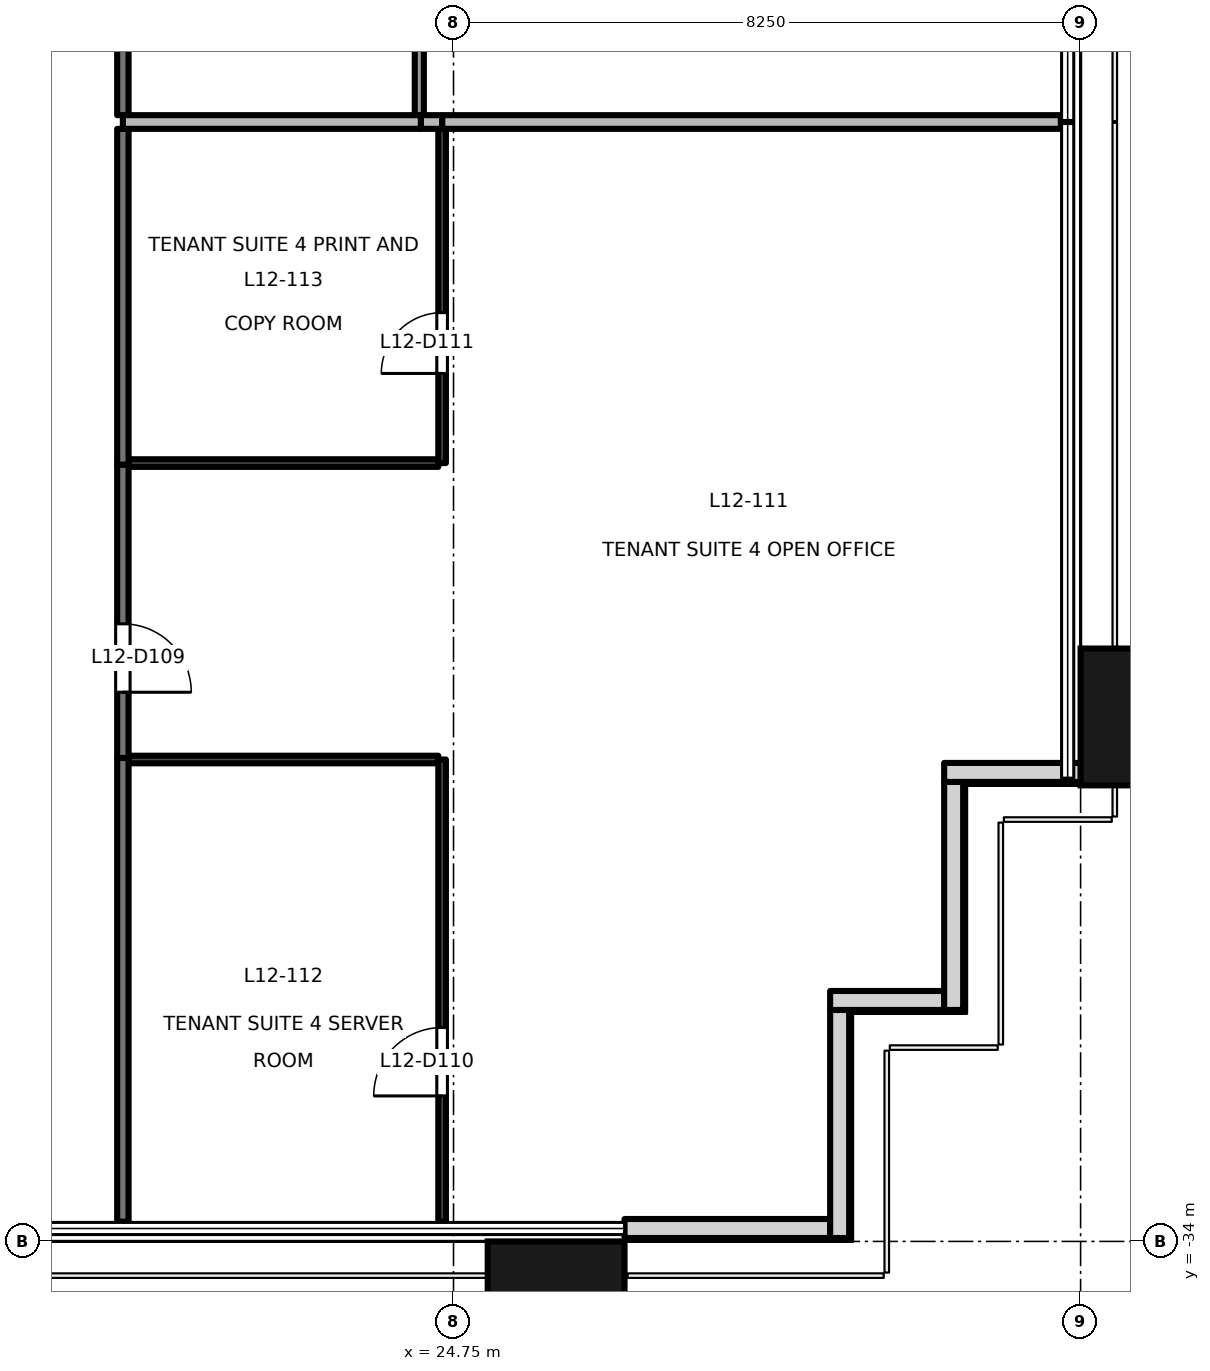
"""IFC4 building model, lengths in metres.
Left out: names, types, materials, properties, quantities, classifications, styles, units other than length and angle.
Written with IfcOpenShell. Run it as: python <this file> out.ifc"""

import sys

from ifc_helpers import new_model, si_unit, direction, frame, frame_2d, origin, origin_2d, place, context, subcontext, project, spatial, rectangle, extrude, element, fill, save


model = new_model("IFC4")
c1 = context("Model", 3, precision=1e-05, world=origin(), true_north=direction((0.0, 1.0)))
c2 = subcontext(c1, "Body", "Model", "MODEL_VIEW")
j1 = project(units=[si_unit("LENGTHUNIT", "METRE"), si_unit("PLANEANGLEUNIT", "RADIAN")], contexts=[c1])
p1 = place(None, origin())
s1 = spatial("IfcSite", under=j1, at=p1, CompositionType="ELEMENT")
p2 = place(p1, origin())
s2 = spatial("IfcBuilding", under=s1, at=p2, CompositionType="ELEMENT")
p3 = place(p2, frame((0.0, 0.0, 57.0)))
s3 = spatial("IfcBuildingStorey", under=s2, at=p3, CompositionType="ELEMENT", Elevation=57.0)
for number, where, z_axis, x_axis in (
    (1, (26.1, -34.9, -0.2), (0.0, 0.0, 1.0), (1.0, 0.0, 0.0)),
    (2, (33.9, -27.1, -0.2), (0.0, 0.0, 1.0), (0.0, 1.0, 0.0)),
):
    element("IfcColumn", number, at=place(p3, frame(where, z_axis=z_axis, x_axis=x_axis)), inside=s3, PredefinedType="COLUMN", context=c2, shape_type="SweptSolid", body=[
        extrude(rectangle(XDim=1.8, YDim=1.8, at=origin_2d()), origin(), (0.0, 0.0, 1.0), 4.1),
    ])
p4 = place(p3, frame((27.0, -33.83, 0.0), z_axis=(0.0, 0.0, 1.0), x_axis=(1.0, 0.0, 0.0)))
e3 = element("IfcWall", 3, at=p4, inside=s3, PredefinedType="SOLIDWALL", context=c2, shape_type="SweptSolid", body=[
    extrude(rectangle(XDim=2.705, YDim=0.25, at=frame_2d((1.353, 0.0))), origin(), (0.0, 0.0, 1.0), 3.9),
])
p5 = place(p3, frame((29.83, -33.955, 0.0), z_axis=(0.0, 0.0, 1.0), x_axis=(0.0, 1.0, 0.0)))
e4 = element("IfcWall", 4, at=p5, inside=s3, PredefinedType="SOLIDWALL", context=c2, shape_type="SweptSolid", body=[
    extrude(rectangle(XDim=3.0, YDim=0.25, at=frame_2d((1.5, 0.0))), origin(), (0.0, 0.0, 1.0), 3.9),
])
p6 = place(p3, frame((29.705, -30.83, 0.0), z_axis=(0.0, 0.0, 1.0), x_axis=(1.0, 0.0, 0.0)))
e5 = element("IfcWall", 5, at=p6, inside=s3, PredefinedType="SOLIDWALL", context=c2, shape_type="SweptSolid", body=[
    extrude(rectangle(XDim=1.5, YDim=0.25, at=frame_2d((0.75, 0.0))), origin(), (0.0, 0.0, 1.0), 3.9),
])
p7 = place(p3, frame((31.33, -30.955, 0.0), z_axis=(0.0, 0.0, 1.0), x_axis=(0.0, 1.0, 0.0)))
e6 = element("IfcWall", 6, at=p7, inside=s3, PredefinedType="SOLIDWALL", context=c2, shape_type="SweptSolid", body=[
    extrude(rectangle(XDim=3.0, YDim=0.25, at=frame_2d((1.5, 0.0))), origin(), (0.0, 0.0, 1.0), 3.9),
])
p8 = place(p3, frame((31.205, -27.83, 0.0), z_axis=(0.0, 0.0, 1.0), x_axis=(1.0, 0.0, 0.0)))
e7 = element("IfcWall", 7, at=p8, inside=s3, PredefinedType="SOLIDWALL", context=c2, shape_type="SweptSolid", body=[
    extrude(rectangle(XDim=1.8, YDim=0.25, at=frame_2d((0.9, 0.0))), origin(), (0.0, 0.0, 1.0), 3.9),
])
p9 = place(p3, frame((20.4, -23.78, 0.0), z_axis=(0.0, 0.0, 1.0), x_axis=(0.0, -1.0, 0.0)))
e8 = element("IfcWall", 8, at=p9, inside=s3, PredefinedType="PARTITIONING", context=c2, shape_type="SweptSolid", body=[
    extrude(rectangle(XDim=3.86, YDim=0.15, at=frame_2d((1.93, 0.0))), origin(), (0.0, 0.0, 1.0), 3.3),
])
p10 = place(p9, frame((2.095, 0.0, 0.0)))
e9 = element("IfcOpeningElement", 9, at=p10, cuts=e8, PredefinedType="OPENING", context=c2, shape_type="SweptSolid", body=[
    extrude(rectangle(XDim=0.9, YDim=2.1, at=frame_2d((0.45, 1.05))), frame((0.0, 0.085, 0.0), z_axis=(0.0, -1.0, 0.0), x_axis=(1.0, 0.0, 0.0)), (0.0, 0.0, 1.0), 0.171),
])
p11 = place(p3, frame((20.4, -27.64, 0.0), z_axis=(0.0, 0.0, 1.0), x_axis=(0.0, -1.0, 0.0)))
e10 = element("IfcWall", 10, at=p11, inside=s3, PredefinedType="PARTITIONING", context=c2, shape_type="SweptSolid", body=[
    extrude(rectangle(XDim=6.1, YDim=0.15, at=frame_2d((3.05, 0.0))), origin(), (0.0, 0.0, 1.0), 3.9),
])
p12 = place(p3, frame((20.4, -19.363, 0.0), z_axis=(0.0, 0.0, 1.0), x_axis=(0.0, -1.0, 0.0)))
e11 = element("IfcWall", 11, at=p12, inside=s3, PredefinedType="PARTITIONING", context=c2, shape_type="SweptSolid", body=[
    extrude(rectangle(XDim=4.417, YDim=0.15, at=frame_2d((2.208, 0.0))), origin(), (0.0, 0.0, 1.0), 3.3),
])
p13 = place(p3, frame((20.4, -10.253, 0.0), z_axis=(0.0, 0.0, 1.0), x_axis=(0.0, -1.0, 0.0)))
e12 = element("IfcWall", 12, at=p13, inside=s3, PredefinedType="PARTITIONING", context=c2, shape_type="SweptSolid", body=[
    extrude(rectangle(XDim=8.93, YDim=0.15, at=frame_2d((4.465, 0.0))), origin(), (0.0, 0.0, 1.0), 3.3),
])
p14 = place(p3, frame((24.55, -27.66, 0.0), z_axis=(0.0, 0.0, 1.0), x_axis=(-1.0, 0.0, 0.0)))
e13 = element("IfcWall", 13, at=p14, inside=s3, PredefinedType="PARTITIONING", context=c2, shape_type="SweptSolid", body=[
    extrude(rectangle(XDim=4.075, YDim=0.1, at=frame_2d((2.038, 0.0))), origin(), (0.0, 0.0, 1.0), 3.9),
])
p15 = place(p3, frame((24.6, -33.74, 0.0), z_axis=(0.0, 0.0, 1.0), x_axis=(0.0, 1.0, 0.0)))
e14 = element("IfcWall", 14, at=p15, inside=s3, PredefinedType="PARTITIONING", context=c2, shape_type="SweptSolid", body=[
    extrude(rectangle(XDim=6.08, YDim=0.1, at=frame_2d((3.04, 0.0))), origin(), (0.0, 0.0, 1.0), 3.9),
])
p16 = place(p15, frame((1.654, 0.0, 0.0)))
e15 = element("IfcOpeningElement", 15, at=p16, cuts=e14, PredefinedType="OPENING", context=c2, shape_type="SweptSolid", body=[
    extrude(rectangle(XDim=0.9, YDim=2.1, at=frame_2d((0.45, 1.05))), frame((0.0, 0.061, 0.0), z_axis=(0.0, -1.0, 0.0), x_axis=(1.0, 0.0, 0.0)), (0.0, 0.0, 1.0), 0.121),
])
p17 = place(p3, frame((20.475, -23.76, 0.0), z_axis=(0.0, 0.0, 1.0), x_axis=(1.0, 0.0, 0.0)))
e16 = element("IfcWall", 16, at=p17, inside=s3, PredefinedType="PARTITIONING", context=c2, shape_type="SweptSolid", body=[
    extrude(rectangle(XDim=4.075, YDim=0.1, at=frame_2d((2.038, 0.0))), origin(), (0.0, 0.0, 1.0), 3.9),
])
p18 = place(p3, frame((24.6, -23.76, 0.0), z_axis=(0.0, 0.0, 1.0), x_axis=(0.0, 1.0, 0.0)))
e17 = element("IfcWall", 17, at=p18, inside=s3, PredefinedType="PARTITIONING", context=c2, shape_type="SweptSolid", body=[
    extrude(rectangle(XDim=4.397, YDim=0.1, at=frame_2d((2.198, 0.0))), origin(), (0.0, 0.0, 1.0), 3.3),
])
p19 = place(p18, frame((1.179, 0.0, 0.0)))
e18 = element("IfcOpeningElement", 18, at=p19, cuts=e17, PredefinedType="OPENING", context=c2, shape_type="SweptSolid", body=[
    extrude(rectangle(XDim=0.8, YDim=2.1, at=frame_2d((0.4, 1.05))), frame((0.0, 0.061, 0.0), z_axis=(0.0, -1.0, 0.0), x_axis=(1.0, 0.0, 0.0)), (0.0, 0.0, 1.0), 0.121),
])
p20 = place(p3, frame((24.6, -19.273, 0.0), z_axis=(0.0, 0.0, 1.0), x_axis=(1.0, 0.0, 0.0)))
e19 = element("IfcWall", 19, at=p20, inside=s3, PredefinedType="PARTITIONING", context=c2, shape_type="SweptSolid", body=[
    extrude(rectangle(XDim=8.14, YDim=0.18, at=frame_2d((4.07, 0.0))), origin(), (0.0, 0.0, 1.0), 3.9),
])
p21 = place(p3, frame((24.32, -19.273, 0.0), z_axis=(0.0, 0.0, 1.0), x_axis=(1.0, 0.0, 0.0)))
e20 = element("IfcWall", 20, at=p21, inside=s3, PredefinedType="PARTITIONING", context=c2, shape_type="SweptSolid", body=[
    extrude(rectangle(XDim=0.28, YDim=0.18, at=frame_2d((0.14, 0.0))), origin(), (0.0, 0.0, 1.0), 3.9),
])
p22 = place(p3, frame((20.4, -19.273, 0.0), z_axis=(0.0, 0.0, 1.0), x_axis=(1.0, 0.0, 0.0)))
e21 = element("IfcWall", 21, at=p22, inside=s3, PredefinedType="PARTITIONING", context=c2, shape_type="SweptSolid", body=[
    extrude(rectangle(XDim=3.92, YDim=0.18, at=frame_2d((1.96, 0.0))), origin(), (0.0, 0.0, 1.0), 3.9),
])
p23 = place(p3, frame((24.3, -19.183, 0.0), z_axis=(0.0, 0.0, 1.0), x_axis=(0.0, 1.0, 0.0)))
e22 = element("IfcWall", 22, at=p23, inside=s3, PredefinedType="PARTITIONING", context=c2, shape_type="SweptSolid", body=[
    extrude(rectangle(XDim=8.91, YDim=0.12, at=frame_2d((4.455, 0.0))), origin(), (0.0, 0.0, 1.0), 3.3),
])
p24 = place(p23, frame((5.507, 0.0, 0.0)))
e23 = element("IfcOpeningElement", 23, at=p24, cuts=e22, PredefinedType="OPENING", context=c2, shape_type="SweptSolid", body=[
    extrude(rectangle(XDim=0.9, YDim=2.1, at=frame_2d((0.45, 1.05))), frame((0.0, 0.071, 0.0), z_axis=(0.0, -1.0, 0.0), x_axis=(1.0, 0.0, 0.0)), (0.0, 0.0, 1.0), 0.141),
])
p25 = place(p10, origin())
e24 = element("IfcDoor", 24, at=p25, inside=s3, OperationType="SINGLE_SWING_RIGHT", PredefinedType="DOOR", context=c2, shape_type="SweptSolid", body=[
    extrude(rectangle(XDim=0.9, YDim=2.1, at=frame_2d((0.45, 1.05))), frame((0.0, 0.025, 0.0), z_axis=(0.0, -1.0, 0.0), x_axis=(1.0, 0.0, 0.0)), (0.0, 0.0, 1.0), 0.05),
])
fill(e9, e24)
p26 = place(p16, origin())
e25 = element("IfcDoor", 25, at=p26, inside=s3, OperationType="SINGLE_SWING_LEFT", PredefinedType="DOOR", context=c2, shape_type="SweptSolid", body=[
    extrude(rectangle(XDim=0.9, YDim=2.1, at=frame_2d((0.45, 1.05))), frame((0.0, 0.025, 0.0), z_axis=(0.0, -1.0, 0.0), x_axis=(1.0, 0.0, 0.0)), (0.0, 0.0, 1.0), 0.05),
])
fill(e15, e25)
p27 = place(p19, origin())
e26 = element("IfcDoor", 26, at=p27, inside=s3, OperationType="SINGLE_SWING_LEFT", PredefinedType="DOOR", context=c2, shape_type="SweptSolid", body=[
    extrude(rectangle(XDim=0.8, YDim=2.1, at=frame_2d((0.4, 1.05))), frame((0.0, 0.025, 0.0), z_axis=(0.0, -1.0, 0.0), x_axis=(1.0, 0.0, 0.0)), (0.0, 0.0, 1.0), 0.05),
])
fill(e18, e26)
save(model, sys.argv[1])
